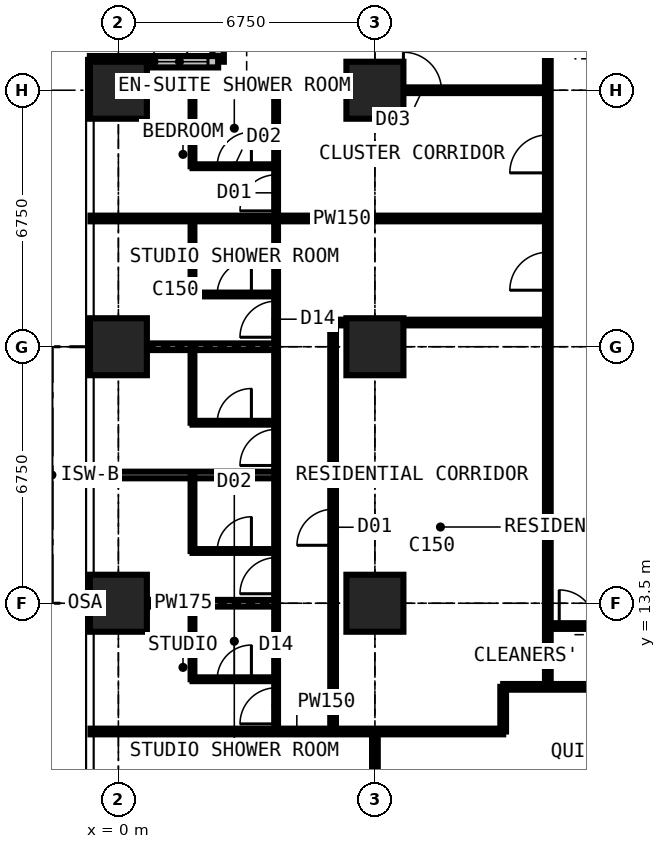
"""IFC4 building model, lengths in metres.
Left out: names, types, materials, properties, quantities, classifications, styles, units other than length and angle.
Written with IfcOpenShell. Run it as: python <this file> out.ifc"""

import sys

from ifc_helpers import new_model, si_unit, direction, frame, frame_2d, origin, origin_2d, place, context, subcontext, project, spatial, rectangle, extrude, element, fill, save


model = new_model("IFC4")
c1 = context("Model", 3, precision=1e-05, world=origin(), true_north=direction((0.0, 1.0)))
c2 = subcontext(c1, "Body", "Model", "MODEL_VIEW")
j1 = project(units=[si_unit("LENGTHUNIT", "METRE"), si_unit("PLANEANGLEUNIT", "RADIAN")], contexts=[c1])
p1 = place(None, origin())
s1 = spatial("IfcSite", under=j1, at=p1, CompositionType="ELEMENT")
p2 = place(p1, origin())
s2 = spatial("IfcBuilding", under=s1, at=p2, CompositionType="ELEMENT")
p3 = place(p2, frame((0.0, 0.0, 126.9)))
s3 = spatial("IfcBuildingStorey", under=s2, at=p3, CompositionType="ELEMENT", Elevation=126.9)
for number, where, z_axis, x_axis in (
    (1, (0.0, 13.5, 0.0), (0.0, 0.0, 1.0), (1.0, 0.0, 0.0)),
    (2, (0.0, 20.25, 0.0), (0.0, 0.0, 1.0), (1.0, 0.0, 0.0)),
    (3, (0.0, 27.0, 0.0), (0.0, 0.0, 1.0), (1.0, 0.0, 0.0)),
    (4, (6.75, 13.5, 0.0), (0.0, 0.0, 1.0), (1.0, 0.0, 0.0)),
    (5, (6.75, 20.25, 0.0), (0.0, 0.0, 1.0), (1.0, 0.0, 0.0)),
    (6, (6.75, 27.0, 0.0), (0.0, 0.0, 1.0), (1.0, 0.0, 0.0)),
):
    element("IfcColumn", number, at=place(p3, frame(where, z_axis=z_axis, x_axis=x_axis)), inside=s3, PredefinedType="COLUMN", context=c2, shape_type="SweptSolid", body=[
        extrude(rectangle(XDim=1.5, YDim=1.5, at=origin_2d()), origin(), (0.0, 0.0, 1.0), 3.6),
    ])
p4 = place(p3, frame((2.625, 31.125, 0.0), z_axis=(0.0, 0.0, 1.0), x_axis=(0.0, -1.0, 0.0)))
e7 = element("IfcWall", 7, at=p4, inside=s3, PredefinedType="SOLIDWALL", context=c2, shape_type="SweptSolid", body=[
    extrude(rectangle(XDim=3.375, YDim=0.3, at=frame_2d((1.688, 0.0))), origin(), (0.0, 0.0, 1.0), 3.375),
])
p5 = place(p4, frame((0.788, 0.0, 0.6)))
e8 = element("IfcOpeningElement", 8, at=p5, cuts=e7, PredefinedType="OPENING", context=c2, shape_type="SweptSolid", body=[
    extrude(rectangle(XDim=1.8, YDim=2.1, at=frame_2d((0.9, 1.05))), frame((0.0, 0.16, 0.0), z_axis=(0.0, -1.0, 0.0), x_axis=(1.0, 0.0, 0.0)), (0.0, 0.0, 1.0), 0.32),
])
p6 = place(p3, frame((2.625, 27.75, 0.0), z_axis=(0.0, 0.0, 1.0), x_axis=(-1.0, 0.0, 0.0)))
e9 = element("IfcWall", 9, at=p6, inside=s3, PredefinedType="SOLIDWALL", context=c2, shape_type="SweptSolid", body=[
    extrude(rectangle(XDim=3.375, YDim=0.3, at=frame_2d((1.688, 0.0))), origin(), (0.0, 0.0, 1.0), 3.375),
])
p7 = place(p6, frame((0.268, 0.0, 0.9)))
e10 = element("IfcOpeningElement", 10, at=p7, cuts=e9, PredefinedType="OPENING", context=c2, shape_type="SweptSolid", body=[
    extrude(rectangle(XDim=1.5, YDim=1.8, at=frame_2d((0.75, 0.9))), frame((0.0, 0.16, 0.0), z_axis=(0.0, -1.0, 0.0), x_axis=(1.0, 0.0, 0.0)), (0.0, 0.0, 1.0), 0.32),
])
p8 = place(p3, frame((-0.734, 10.125, 0.0), z_axis=(0.0, 0.0, 1.0), x_axis=(1.0, 0.0, 0.0)))
e11 = element("IfcWall", 11, at=p8, inside=s3, PredefinedType="PARTITIONING", context=c2, shape_type="SweptSolid", body=[
    extrude(rectangle(XDim=10.859, YDim=0.15, at=frame_2d((5.429, 0.0))), origin(), (0.0, 0.0, 1.0), 3.375),
])
p9 = place(p3, frame((-0.734, 13.5, 0.0), z_axis=(0.0, 0.0, 1.0), x_axis=(1.0, 0.0, 0.0)))
e12 = element("IfcWall", 12, at=p9, inside=s3, PredefinedType="PARTITIONING", context=c2, shape_type="SweptSolid", body=[
    extrude(rectangle(XDim=4.884, YDim=0.175, at=frame_2d((2.442, 0.0))), origin(), (0.0, 0.0, 1.0), 2.61),
])
p10 = place(p3, frame((-0.734, 16.875, 0.0), z_axis=(0.0, 0.0, 1.0), x_axis=(1.0, 0.0, 0.0)))
e13 = element("IfcWall", 13, at=p10, inside=s3, PredefinedType="PARTITIONING", context=c2, shape_type="SweptSolid", body=[
    extrude(rectangle(XDim=4.884, YDim=0.175, at=frame_2d((2.442, 0.0))), origin(), (0.0, 0.0, 1.0), 3.375),
])
p11 = place(p3, frame((-0.734, 20.25, 0.0), z_axis=(0.0, 0.0, 1.0), x_axis=(1.0, 0.0, 0.0)))
e14 = element("IfcWall", 14, at=p11, inside=s3, PredefinedType="PARTITIONING", context=c2, shape_type="SweptSolid", body=[
    extrude(rectangle(XDim=4.884, YDim=0.175, at=frame_2d((2.442, 0.0))), origin(), (0.0, 0.0, 1.0), 2.61),
])
p12 = place(p3, frame((-0.734, 23.625, 0.0), z_axis=(0.0, 0.0, 1.0), x_axis=(1.0, 0.0, 0.0)))
e15 = element("IfcWall", 15, at=p12, inside=s3, PredefinedType="PARTITIONING", context=c2, shape_type="SweptSolid", body=[
    extrude(rectangle(XDim=12.034, YDim=0.15, at=frame_2d((6.017, 0.0))), origin(), (0.0, 0.0, 1.0), 3.375),
])
p13 = place(p3, frame((-0.734, 27.0, 0.0), z_axis=(0.0, 0.0, 1.0), x_axis=(1.0, 0.0, 0.0)))
e16 = element("IfcWall", 16, at=p13, inside=s3, PredefinedType="PARTITIONING", context=c2, shape_type="SweptSolid", body=[
    extrude(rectangle(XDim=12.034, YDim=0.15, at=frame_2d((6.017, 0.0))), origin(), (0.0, 0.0, 1.0), 2.806),
])
p14 = place(p13, frame((8.234, 0.0, 0.0)))
e17 = element("IfcOpeningElement", 17, at=p14, cuts=e16, PredefinedType="OPENING", context=c2, shape_type="SweptSolid", body=[
    extrude(rectangle(XDim=1.0, YDim=2.2, at=frame_2d((0.5, 1.1))), frame((0.0, 0.085, 0.0), z_axis=(0.0, -1.0, 0.0), x_axis=(1.0, 0.0, 0.0)), (0.0, 0.0, 1.0), 0.17),
])
p15 = place(p3, frame((1.95, 11.5, 0.0), z_axis=(0.0, 0.0, 1.0), x_axis=(0.0, 1.0, 0.0)))
e18 = element("IfcWall", 18, at=p15, inside=s3, PredefinedType="PARTITIONING", context=c2, shape_type="SweptSolid", body=[
    extrude(rectangle(XDim=2.0, YDim=0.1, at=frame_2d((1.0, 0.0))), origin(), (0.0, 0.0, 1.0), 3.375),
])
p16 = place(p3, frame((1.95, 11.5, 0.0), z_axis=(0.0, 0.0, 1.0), x_axis=(1.0, 0.0, 0.0)))
e19 = element("IfcWall", 19, at=p16, inside=s3, PredefinedType="PARTITIONING", context=c2, shape_type="SweptSolid", body=[
    extrude(rectangle(XDim=2.2, YDim=0.1, at=frame_2d((1.1, 0.0))), origin(), (0.0, 0.0, 1.0), 3.375),
])
p17 = place(p16, frame((0.65, 0.0, 0.0)))
e20 = element("IfcOpeningElement", 20, at=p17, cuts=e19, PredefinedType="OPENING", context=c2, shape_type="SweptSolid", body=[
    extrude(rectangle(XDim=0.9, YDim=2.2, at=frame_2d((0.45, 1.1))), frame((0.0, 0.06, 0.0), z_axis=(0.0, -1.0, 0.0), x_axis=(1.0, 0.0, 0.0)), (0.0, 0.0, 1.0), 0.12),
])
p18 = place(p3, frame((1.95, 14.875, 0.0), z_axis=(0.0, 0.0, 1.0), x_axis=(0.0, 1.0, 0.0)))
e21 = element("IfcWall", 21, at=p18, inside=s3, PredefinedType="PARTITIONING", context=c2, shape_type="SweptSolid", body=[
    extrude(rectangle(XDim=2.0, YDim=0.1, at=frame_2d((1.0, 0.0))), origin(), (0.0, 0.0, 1.0), 3.375),
])
p19 = place(p3, frame((1.95, 14.875, 0.0), z_axis=(0.0, 0.0, 1.0), x_axis=(1.0, 0.0, 0.0)))
e22 = element("IfcWall", 22, at=p19, inside=s3, PredefinedType="PARTITIONING", context=c2, shape_type="SweptSolid", body=[
    extrude(rectangle(XDim=2.2, YDim=0.1, at=frame_2d((1.1, 0.0))), origin(), (0.0, 0.0, 1.0), 3.375),
])
p20 = place(p19, frame((0.65, 0.0, 0.0)))
e23 = element("IfcOpeningElement", 23, at=p20, cuts=e22, PredefinedType="OPENING", context=c2, shape_type="SweptSolid", body=[
    extrude(rectangle(XDim=0.9, YDim=2.2, at=frame_2d((0.45, 1.1))), frame((0.0, 0.06, 0.0), z_axis=(0.0, -1.0, 0.0), x_axis=(1.0, 0.0, 0.0)), (0.0, 0.0, 1.0), 0.12),
])
p21 = place(p3, frame((1.95, 18.25, 0.0), z_axis=(0.0, 0.0, 1.0), x_axis=(0.0, 1.0, 0.0)))
e24 = element("IfcWall", 24, at=p21, inside=s3, PredefinedType="PARTITIONING", context=c2, shape_type="SweptSolid", body=[
    extrude(rectangle(XDim=2.0, YDim=0.1, at=frame_2d((1.0, 0.0))), origin(), (0.0, 0.0, 1.0), 3.375),
])
p22 = place(p3, frame((1.95, 18.25, 0.0), z_axis=(0.0, 0.0, 1.0), x_axis=(1.0, 0.0, 0.0)))
e25 = element("IfcWall", 25, at=p22, inside=s3, PredefinedType="PARTITIONING", context=c2, shape_type="SweptSolid", body=[
    extrude(rectangle(XDim=2.2, YDim=0.1, at=frame_2d((1.1, 0.0))), origin(), (0.0, 0.0, 1.0), 3.375),
])
p23 = place(p22, frame((0.65, 0.0, 0.0)))
e26 = element("IfcOpeningElement", 26, at=p23, cuts=e25, PredefinedType="OPENING", context=c2, shape_type="SweptSolid", body=[
    extrude(rectangle(XDim=0.9, YDim=2.2, at=frame_2d((0.45, 1.1))), frame((0.0, 0.06, 0.0), z_axis=(0.0, -1.0, 0.0), x_axis=(1.0, 0.0, 0.0)), (0.0, 0.0, 1.0), 0.12),
])
p24 = place(p3, frame((1.95, 21.625, 0.0), z_axis=(0.0, 0.0, 1.0), x_axis=(0.0, 1.0, 0.0)))
e27 = element("IfcWall", 27, at=p24, inside=s3, PredefinedType="PARTITIONING", context=c2, shape_type="SweptSolid", body=[
    extrude(rectangle(XDim=2.0, YDim=0.1, at=frame_2d((1.0, 0.0))), origin(), (0.0, 0.0, 1.0), 3.375),
])
p25 = place(p3, frame((1.95, 21.625, 0.0), z_axis=(0.0, 0.0, 1.0), x_axis=(1.0, 0.0, 0.0)))
e28 = element("IfcWall", 28, at=p25, inside=s3, PredefinedType="PARTITIONING", context=c2, shape_type="SweptSolid", body=[
    extrude(rectangle(XDim=2.2, YDim=0.1, at=frame_2d((1.1, 0.0))), origin(), (0.0, 0.0, 1.0), 3.375),
])
p26 = place(p25, frame((0.65, 0.0, 0.0)))
e29 = element("IfcOpeningElement", 29, at=p26, cuts=e28, PredefinedType="OPENING", context=c2, shape_type="SweptSolid", body=[
    extrude(rectangle(XDim=0.9, YDim=2.2, at=frame_2d((0.45, 1.1))), frame((0.0, 0.06, 0.0), z_axis=(0.0, -1.0, 0.0), x_axis=(1.0, 0.0, 0.0)), (0.0, 0.0, 1.0), 0.12),
])
p27 = place(p3, frame((1.95, 25.0, 0.0), z_axis=(0.0, 0.0, 1.0), x_axis=(0.0, 1.0, 0.0)))
e30 = element("IfcWall", 30, at=p27, inside=s3, PredefinedType="PARTITIONING", context=c2, shape_type="SweptSolid", body=[
    extrude(rectangle(XDim=2.0, YDim=0.1, at=frame_2d((1.0, 0.0))), origin(), (0.0, 0.0, 1.0), 3.375),
])
p28 = place(p3, frame((1.95, 25.0, 0.0), z_axis=(0.0, 0.0, 1.0), x_axis=(1.0, 0.0, 0.0)))
e31 = element("IfcWall", 31, at=p28, inside=s3, PredefinedType="PARTITIONING", context=c2, shape_type="SweptSolid", body=[
    extrude(rectangle(XDim=2.2, YDim=0.1, at=frame_2d((1.1, 0.0))), origin(), (0.0, 0.0, 1.0), 3.375),
])
p29 = place(p28, frame((0.65, 0.0, 0.0)))
e32 = element("IfcOpeningElement", 32, at=p29, cuts=e31, PredefinedType="OPENING", context=c2, shape_type="SweptSolid", body=[
    extrude(rectangle(XDim=0.9, YDim=2.2, at=frame_2d((0.45, 1.1))), frame((0.0, 0.06, 0.0), z_axis=(0.0, -1.0, 0.0), x_axis=(1.0, 0.0, 0.0)), (0.0, 0.0, 1.0), 0.12),
])
p30 = place(p3, frame((4.15, 10.125, 0.0), z_axis=(0.0, 0.0, 1.0), x_axis=(0.0, 1.0, 0.0)))
e33 = element("IfcWall", 33, at=p30, inside=s3, PredefinedType="PARTITIONING", context=c2, shape_type="SweptSolid", body=[
    extrude(rectangle(XDim=16.875, YDim=0.1, at=frame_2d((8.438, 0.0))), origin(), (0.0, 0.0, 1.0), 3.375),
])
p31 = place(p30, frame((13.7, 0.0, 0.0)))
e34 = element("IfcOpeningElement", 34, at=p31, cuts=e33, PredefinedType="OPENING", context=c2, shape_type="SweptSolid", body=[
    extrude(rectangle(XDim=0.95, YDim=2.2, at=frame_2d((0.475, 1.1))), frame((0.0, 0.06, 0.0), z_axis=(0.0, -1.0, 0.0), x_axis=(1.0, 0.0, 0.0)), (0.0, 0.0, 1.0), 0.12),
])
p32 = place(p30, frame((0.2, 0.0, 0.0)))
e35 = element("IfcOpeningElement", 35, at=p32, cuts=e33, PredefinedType="OPENING", context=c2, shape_type="SweptSolid", body=[
    extrude(rectangle(XDim=0.95, YDim=2.2, at=frame_2d((0.475, 1.1))), frame((0.0, 0.06, 0.0), z_axis=(0.0, -1.0, 0.0), x_axis=(1.0, 0.0, 0.0)), (0.0, 0.0, 1.0), 0.12),
])
p33 = place(p30, frame((3.625, 0.0, 0.0)))
e36 = element("IfcOpeningElement", 36, at=p33, cuts=e33, PredefinedType="OPENING", context=c2, shape_type="SweptSolid", body=[
    extrude(rectangle(XDim=0.95, YDim=2.2, at=frame_2d((0.475, 1.1))), frame((0.0, 0.06, 0.0), z_axis=(0.0, -1.0, 0.0), x_axis=(1.0, 0.0, 0.0)), (0.0, 0.0, 1.0), 0.12),
])
p34 = place(p30, frame((7.0, 0.0, 0.0)))
e37 = element("IfcOpeningElement", 37, at=p34, cuts=e33, PredefinedType="OPENING", context=c2, shape_type="SweptSolid", body=[
    extrude(rectangle(XDim=0.95, YDim=2.2, at=frame_2d((0.475, 1.1))), frame((0.0, 0.06, 0.0), z_axis=(0.0, -1.0, 0.0), x_axis=(1.0, 0.0, 0.0)), (0.0, 0.0, 1.0), 0.12),
])
p35 = place(p30, frame((10.375, 0.0, 0.0)))
e38 = element("IfcOpeningElement", 38, at=p35, cuts=e33, PredefinedType="OPENING", context=c2, shape_type="SweptSolid", body=[
    extrude(rectangle(XDim=0.95, YDim=2.2, at=frame_2d((0.475, 1.1))), frame((0.0, 0.06, 0.0), z_axis=(0.0, -1.0, 0.0), x_axis=(1.0, 0.0, 0.0)), (0.0, 0.0, 1.0), 0.12),
])
p36 = place(p3, frame((5.65, 10.125, 0.0), z_axis=(0.0, 0.0, 1.0), x_axis=(0.0, 1.0, 0.0)))
e39 = element("IfcWall", 39, at=p36, inside=s3, PredefinedType="PARTITIONING", context=c2, shape_type="SweptSolid", body=[
    extrude(rectangle(XDim=10.762, YDim=0.15, at=frame_2d((5.381, 0.0))), origin(), (0.0, 0.0, 1.0), 3.375),
])
p37 = place(p36, frame((4.9, 0.0, 0.0)))
e40 = element("IfcOpeningElement", 40, at=p37, cuts=e39, PredefinedType="OPENING", context=c2, shape_type="SweptSolid", body=[
    extrude(rectangle(XDim=0.95, YDim=2.2, at=frame_2d((0.475, 1.1))), frame((0.0, 0.085, 0.0), z_axis=(0.0, -1.0, 0.0), x_axis=(1.0, 0.0, 0.0)), (0.0, 0.0, 1.0), 0.17),
])
p38 = place(p3, frame((5.65, 20.887, 0.0), z_axis=(0.0, 0.0, 1.0), x_axis=(1.0, 0.0, 0.0)))
e41 = element("IfcWall", 41, at=p38, inside=s3, PredefinedType="PARTITIONING", context=c2, shape_type="SweptSolid", body=[
    extrude(rectangle(XDim=5.65, YDim=0.15, at=frame_2d((2.825, 0.0))), origin(), (0.0, 0.0, 1.0), 3.375),
])
p39 = place(p3, frame((6.75, 4.15, 0.0), z_axis=(0.0, 0.0, 1.0), x_axis=(0.0, 1.0, 0.0)))
e42 = element("IfcWall", 42, at=p39, inside=s3, PredefinedType="PARTITIONING", context=c2, shape_type="SweptSolid", body=[
    extrude(rectangle(XDim=5.975, YDim=0.15, at=frame_2d((2.988, 0.0))), origin(), (0.0, 0.0, 1.0), 2.877),
])
p40 = place(p3, frame((10.125, 10.125, 0.0), z_axis=(0.0, 0.0, 1.0), x_axis=(0.0, 1.0, 0.0)))
e43 = element("IfcWall", 43, at=p40, inside=s3, PredefinedType="PARTITIONING", context=c2, shape_type="SweptSolid", body=[
    extrude(rectangle(XDim=1.175, YDim=0.15, at=frame_2d((0.587, 0.0))), origin(), (0.0, 0.0, 1.0), 3.375),
])
p41 = place(p3, frame((10.125, 11.3, 0.0), z_axis=(0.0, 0.0, 1.0), x_axis=(1.0, 0.0, 0.0)))
e44 = element("IfcWall", 44, at=p41, inside=s3, PredefinedType="PARTITIONING", context=c2, shape_type="SweptSolid", body=[
    extrude(rectangle(XDim=20.675, YDim=0.15, at=frame_2d((10.337, 0.0))), origin(), (0.0, 0.0, 1.0), 3.375),
])
p42 = place(p41, frame((11.312, 0.0, 0.0)))
e45 = element("IfcOpeningElement", 45, at=p42, cuts=e44, PredefinedType="OPENING", context=c2, shape_type="SweptSolid", body=[
    extrude(rectangle(XDim=1.0, YDim=2.2, at=frame_2d((0.5, 1.1))), frame((0.0, 0.085, 0.0), z_axis=(0.0, -1.0, 0.0), x_axis=(1.0, 0.0, 0.0)), (0.0, 0.0, 1.0), 0.17),
])
p43 = place(p3, frame((11.3, 11.3, 0.0), z_axis=(0.0, 0.0, 1.0), x_axis=(0.0, 1.0, 0.0)))
e46 = element("IfcWall", 46, at=p43, inside=s3, PredefinedType="PARTITIONING", context=c2, shape_type="SweptSolid", body=[
    extrude(rectangle(XDim=19.3, YDim=0.15, at=frame_2d((9.65, 0.0))), origin(), (0.0, 0.0, 1.0), 3.375),
])
p44 = place(p43, frame((13.525, 0.0, 0.0)))
e47 = element("IfcOpeningElement", 47, at=p44, cuts=e46, PredefinedType="OPENING", context=c2, shape_type="SweptSolid", body=[
    extrude(rectangle(XDim=1.0, YDim=2.2, at=frame_2d((0.5, 1.1))), frame((0.0, 0.085, 0.0), z_axis=(0.0, -1.0, 0.0), x_axis=(1.0, 0.0, 0.0)), (0.0, 0.0, 1.0), 0.17),
])
p45 = place(p43, frame((10.438, 0.0, 0.0)))
e48 = element("IfcOpeningElement", 48, at=p45, cuts=e46, PredefinedType="OPENING", context=c2, shape_type="SweptSolid", body=[
    extrude(rectangle(XDim=1.0, YDim=2.2, at=frame_2d((0.5, 1.1))), frame((0.0, 0.085, 0.0), z_axis=(0.0, -1.0, 0.0), x_axis=(1.0, 0.0, 0.0)), (0.0, 0.0, 1.0), 0.17),
])
p46 = place(p3, frame((11.3, 12.9, 0.0), z_axis=(0.0, 0.0, 1.0), x_axis=(1.0, 0.0, 0.0)))
e49 = element("IfcWall", 49, at=p46, inside=s3, PredefinedType="PARTITIONING", context=c2, shape_type="SweptSolid", body=[
    extrude(rectangle(XDim=1.6, YDim=0.15, at=frame_2d((0.8, 0.0))), origin(), (0.0, 0.0, 1.0), 2.806),
])
p47 = place(p46, frame((0.3, 0.0, 0.0)))
e50 = element("IfcOpeningElement", 50, at=p47, cuts=e49, PredefinedType="OPENING", context=c2, shape_type="SweptSolid", body=[
    extrude(rectangle(XDim=0.95, YDim=2.2, at=frame_2d((0.475, 1.1))), frame((0.0, 0.085, 0.0), z_axis=(0.0, -1.0, 0.0), x_axis=(1.0, 0.0, 0.0)), (0.0, 0.0, 1.0), 0.17),
])
p48 = place(p7, origin())
e51 = element("IfcWindow", 51, at=p48, inside=s3, PartitioningType="SINGLE_PANEL", PredefinedType="WINDOW", context=c2, shape_type="SweptSolid", body=[
    extrude(rectangle(XDim=1.5, YDim=1.8, at=frame_2d((0.75, 0.9))), frame((0.0, 0.03, 0.0), z_axis=(0.0, -1.0, 0.0), x_axis=(1.0, 0.0, 0.0)), (0.0, 0.0, 1.0), 0.06),
])
fill(e10, e51)
p49 = place(p47, origin())
e52 = element("IfcDoor", 52, at=p49, inside=s3, OperationType="SINGLE_SWING_LEFT", PredefinedType="DOOR", context=c2, shape_type="SweptSolid", body=[
    extrude(rectangle(XDim=0.95, YDim=2.2, at=frame_2d((0.475, 1.1))), frame((0.0, 0.025, 0.0), z_axis=(0.0, -1.0, 0.0), x_axis=(1.0, 0.0, 0.0)), (0.0, 0.0, 1.0), 0.05),
])
fill(e50, e52)
p50 = place(p14, origin())
e53 = element("IfcDoor", 53, at=p50, inside=s3, OperationType="SINGLE_SWING_LEFT", PredefinedType="DOOR", context=c2, shape_type="SweptSolid", body=[
    extrude(rectangle(XDim=1.0, YDim=2.2, at=frame_2d((0.5, 1.1))), frame((0.0, 0.025, 0.0), z_axis=(0.0, -1.0, 0.0), x_axis=(1.0, 0.0, 0.0)), (0.0, 0.0, 1.0), 0.05),
])
fill(e17, e53)
p51 = place(p31, origin())
e54 = element("IfcDoor", 54, at=p51, inside=s3, OperationType="SINGLE_SWING_LEFT", PredefinedType="DOOR", context=c2, shape_type="SweptSolid", body=[
    extrude(rectangle(XDim=0.95, YDim=2.2, at=frame_2d((0.475, 1.1))), frame((0.0, 0.025, 0.0), z_axis=(0.0, -1.0, 0.0), x_axis=(1.0, 0.0, 0.0)), (0.0, 0.0, 1.0), 0.05),
])
fill(e34, e54)
p52 = place(p29, origin())
e55 = element("IfcDoor", 55, at=p52, inside=s3, OperationType="SINGLE_SWING_RIGHT", PredefinedType="DOOR", context=c2, shape_type="SweptSolid", body=[
    extrude(rectangle(XDim=0.9, YDim=2.2, at=frame_2d((0.45, 1.1))), frame((0.0, 0.025, 0.0), z_axis=(0.0, -1.0, 0.0), x_axis=(1.0, 0.0, 0.0)), (0.0, 0.0, 1.0), 0.05),
])
fill(e32, e55)
p53 = place(p44, origin())
e56 = element("IfcDoor", 56, at=p53, inside=s3, OperationType="SINGLE_SWING_LEFT", PredefinedType="DOOR", context=c2, shape_type="SweptSolid", body=[
    extrude(rectangle(XDim=1.0, YDim=2.2, at=frame_2d((0.5, 1.1))), frame((0.0, 0.025, 0.0), z_axis=(0.0, -1.0, 0.0), x_axis=(1.0, 0.0, 0.0)), (0.0, 0.0, 1.0), 0.05),
])
fill(e47, e56)
p54 = place(p32, origin())
e57 = element("IfcDoor", 57, at=p54, inside=s3, OperationType="SINGLE_SWING_LEFT", PredefinedType="DOOR", context=c2, shape_type="SweptSolid", body=[
    extrude(rectangle(XDim=0.95, YDim=2.2, at=frame_2d((0.475, 1.1))), frame((0.0, 0.025, 0.0), z_axis=(0.0, -1.0, 0.0), x_axis=(1.0, 0.0, 0.0)), (0.0, 0.0, 1.0), 0.05),
])
fill(e35, e57)
p55 = place(p17, origin())
e58 = element("IfcDoor", 58, at=p55, inside=s3, OperationType="SINGLE_SWING_RIGHT", PredefinedType="DOOR", context=c2, shape_type="SweptSolid", body=[
    extrude(rectangle(XDim=0.9, YDim=2.2, at=frame_2d((0.45, 1.1))), frame((0.0, 0.025, 0.0), z_axis=(0.0, -1.0, 0.0), x_axis=(1.0, 0.0, 0.0)), (0.0, 0.0, 1.0), 0.05),
])
fill(e20, e58)
p56 = place(p33, origin())
e59 = element("IfcDoor", 59, at=p56, inside=s3, OperationType="SINGLE_SWING_LEFT", PredefinedType="DOOR", context=c2, shape_type="SweptSolid", body=[
    extrude(rectangle(XDim=0.95, YDim=2.2, at=frame_2d((0.475, 1.1))), frame((0.0, 0.025, 0.0), z_axis=(0.0, -1.0, 0.0), x_axis=(1.0, 0.0, 0.0)), (0.0, 0.0, 1.0), 0.05),
])
fill(e36, e59)
p57 = place(p20, origin())
e60 = element("IfcDoor", 60, at=p57, inside=s3, OperationType="SINGLE_SWING_RIGHT", PredefinedType="DOOR", context=c2, shape_type="SweptSolid", body=[
    extrude(rectangle(XDim=0.9, YDim=2.2, at=frame_2d((0.45, 1.1))), frame((0.0, 0.025, 0.0), z_axis=(0.0, -1.0, 0.0), x_axis=(1.0, 0.0, 0.0)), (0.0, 0.0, 1.0), 0.05),
])
fill(e23, e60)
p58 = place(p34, origin())
e61 = element("IfcDoor", 61, at=p58, inside=s3, OperationType="SINGLE_SWING_LEFT", PredefinedType="DOOR", context=c2, shape_type="SweptSolid", body=[
    extrude(rectangle(XDim=0.95, YDim=2.2, at=frame_2d((0.475, 1.1))), frame((0.0, 0.025, 0.0), z_axis=(0.0, -1.0, 0.0), x_axis=(1.0, 0.0, 0.0)), (0.0, 0.0, 1.0), 0.05),
])
fill(e37, e61)
p59 = place(p23, origin())
e62 = element("IfcDoor", 62, at=p59, inside=s3, OperationType="SINGLE_SWING_RIGHT", PredefinedType="DOOR", context=c2, shape_type="SweptSolid", body=[
    extrude(rectangle(XDim=0.9, YDim=2.2, at=frame_2d((0.45, 1.1))), frame((0.0, 0.025, 0.0), z_axis=(0.0, -1.0, 0.0), x_axis=(1.0, 0.0, 0.0)), (0.0, 0.0, 1.0), 0.05),
])
fill(e26, e62)
p60 = place(p35, origin())
e63 = element("IfcDoor", 63, at=p60, inside=s3, OperationType="SINGLE_SWING_LEFT", PredefinedType="DOOR", context=c2, shape_type="SweptSolid", body=[
    extrude(rectangle(XDim=0.95, YDim=2.2, at=frame_2d((0.475, 1.1))), frame((0.0, 0.025, 0.0), z_axis=(0.0, -1.0, 0.0), x_axis=(1.0, 0.0, 0.0)), (0.0, 0.0, 1.0), 0.05),
])
fill(e38, e63)
p61 = place(p26, origin())
e64 = element("IfcDoor", 64, at=p61, inside=s3, OperationType="SINGLE_SWING_RIGHT", PredefinedType="DOOR", context=c2, shape_type="SweptSolid", body=[
    extrude(rectangle(XDim=0.9, YDim=2.2, at=frame_2d((0.45, 1.1))), frame((0.0, 0.025, 0.0), z_axis=(0.0, -1.0, 0.0), x_axis=(1.0, 0.0, 0.0)), (0.0, 0.0, 1.0), 0.05),
])
fill(e29, e64)
p62 = place(p45, origin())
e65 = element("IfcDoor", 65, at=p62, inside=s3, OperationType="SINGLE_SWING_LEFT", PredefinedType="DOOR", context=c2, shape_type="SweptSolid", body=[
    extrude(rectangle(XDim=1.0, YDim=2.2, at=frame_2d((0.5, 1.1))), frame((0.0, 0.025, 0.0), z_axis=(0.0, -1.0, 0.0), x_axis=(1.0, 0.0, 0.0)), (0.0, 0.0, 1.0), 0.05),
])
fill(e48, e65)
p63 = place(p37, origin())
e66 = element("IfcDoor", 66, at=p63, inside=s3, OperationType="SINGLE_SWING_LEFT", PredefinedType="DOOR", context=c2, shape_type="SweptSolid", body=[
    extrude(rectangle(XDim=0.95, YDim=2.2, at=frame_2d((0.475, 1.1))), frame((0.0, 0.025, 0.0), z_axis=(0.0, -1.0, 0.0), x_axis=(1.0, 0.0, 0.0)), (0.0, 0.0, 1.0), 0.05),
])
fill(e40, e66)
save(model, sys.argv[1])
